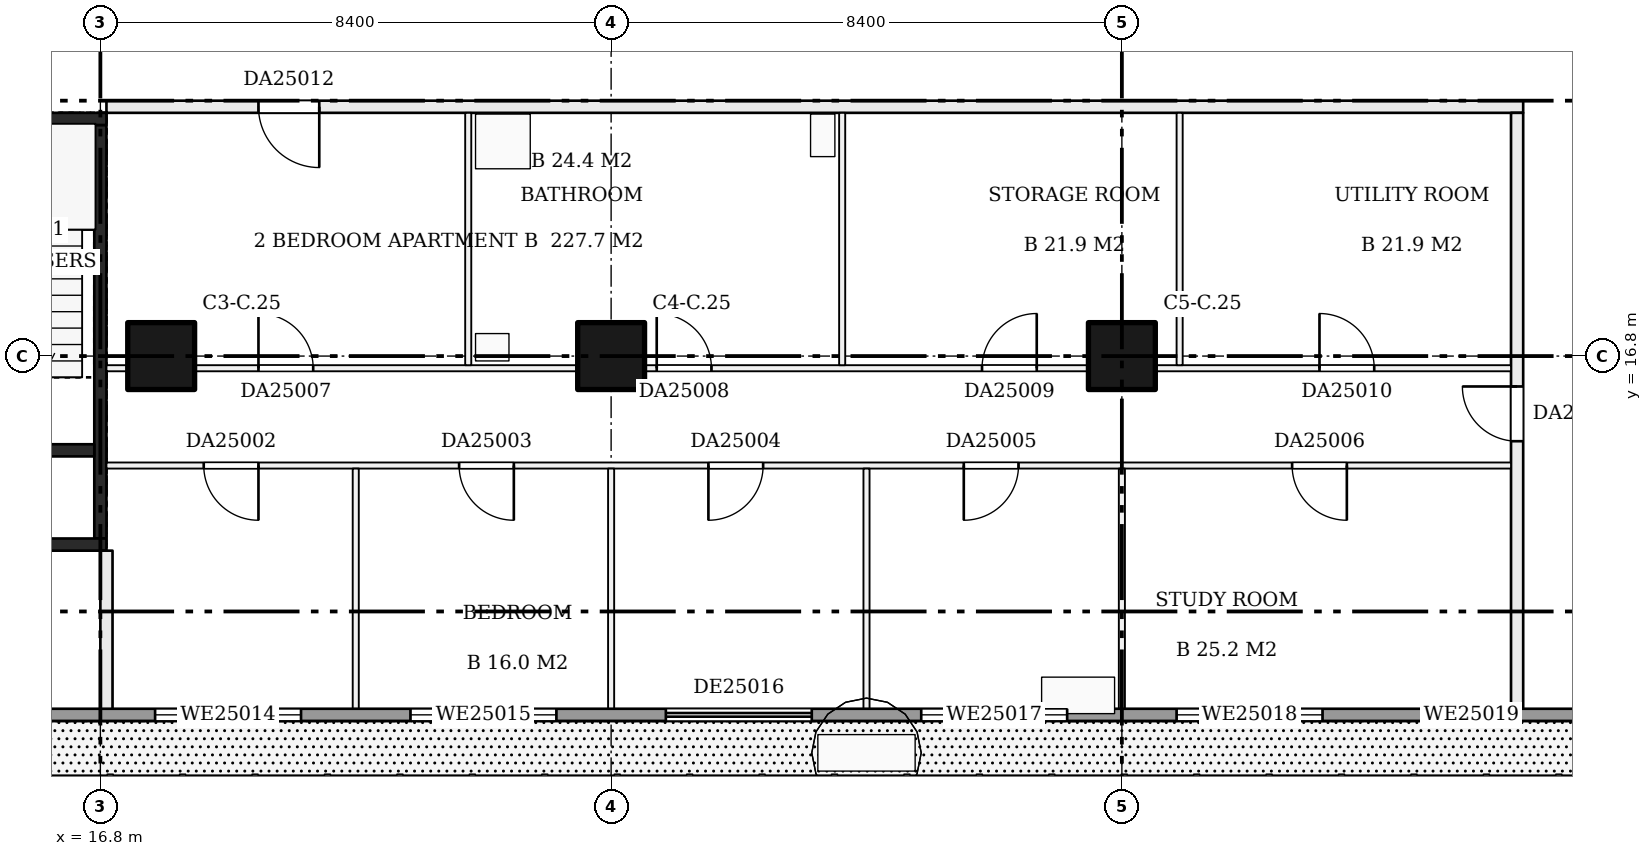
"""IFC4 building model, lengths in metres.
Left out: names, types, materials, properties, quantities, classifications, styles, units other than length and angle.
Written with IfcOpenShell. Run it as: python <this file> out.ifc"""

import sys

from ifc_helpers import new_model, si_unit, direction, frame, frame_2d, origin, origin_2d, place, context, subcontext, project, spatial, rectangle, extrude, element, fill, save


model = new_model("IFC4")
c1 = context("Model", 3, precision=1e-05, world=origin(), true_north=direction((0.0, 1.0)))
c2 = subcontext(c1, "Body", "Model", "MODEL_VIEW")
j1 = project(units=[si_unit("LENGTHUNIT", "METRE"), si_unit("PLANEANGLEUNIT", "RADIAN")], contexts=[c1])
p1 = place(None, origin())
s1 = spatial("IfcSite", under=j1, at=p1, CompositionType="ELEMENT")
p2 = place(p1, origin())
s2 = spatial("IfcBuilding", under=s1, at=p2, CompositionType="ELEMENT")
p3 = place(p2, frame((0.0, 0.0, 102.2)))
s3 = spatial("IfcBuildingStorey", under=s2, at=p3, CompositionType="ELEMENT", Elevation=102.2)
for number, where, z_axis, x_axis in (
    (1, (17.8, 16.8, 0.0), (0.0, 0.0, 1.0), (1.0, 0.0, 0.0)),
    (2, (25.2, 16.8, 0.0), (0.0, 0.0, 1.0), (1.0, 0.0, 0.0)),
    (3, (33.6, 16.8, 0.0), (0.0, 0.0, 1.0), (1.0, 0.0, 0.0)),
):
    element("IfcColumn", number, at=place(p3, frame(where, z_axis=z_axis, x_axis=x_axis)), inside=s3, PredefinedType="COLUMN", context=c2, shape_type="SweptSolid", body=[
        extrude(rectangle(XDim=1.1, YDim=1.1, at=origin_2d()), origin(), (0.0, 0.0, 1.0), 3.22),
    ])
p4 = place(p3, frame((16.8, 13.8, 0.0), z_axis=(0.0, 0.0, 1.0), x_axis=(0.0, 1.0, 0.0)))
e4 = element("IfcWall", 4, at=p4, inside=s3, PredefinedType="SHEAR", context=c2, shape_type="SweptSolid", body=[
    extrude(rectangle(XDim=6.8, YDim=0.2, at=frame_2d((3.4, 0.0))), origin(), (0.0, 0.0, 1.0), 3.22),
])
for number, where, z_axis, x_axis in (
    (5, (13.5, 13.7, 0.0), (0.0, 0.0, 1.0), (1.0, 0.0, 0.0)),
    (6, (13.5, 20.7, 0.0), (0.0, 0.0, 1.0), (1.0, 0.0, 0.0)),
):
    element("IfcWall", number, at=place(p3, frame(where, z_axis=z_axis, x_axis=x_axis)), inside=s3, PredefinedType="SHEAR", context=c2, shape_type="SweptSolid", body=[
        extrude(rectangle(XDim=3.4, YDim=0.2, at=frame_2d((1.7, 0.0))), origin(), (0.0, 0.0, 1.0), 3.22),
    ])
p5 = place(p3, frame((13.7, 15.25, 0.0), z_axis=(0.0, 0.0, 1.0), x_axis=(1.0, 0.0, 0.0)))
e7 = element("IfcWall", 7, at=p5, inside=s3, PredefinedType="SHEAR", context=c2, shape_type="SweptSolid", body=[
    extrude(rectangle(XDim=3.0, YDim=0.2, at=frame_2d((1.5, 0.0))), origin(), (0.0, 0.0, 1.0), 3.22),
])
p6 = place(p5, frame((1.0, 0.0, 0.0)))
e8 = element("IfcOpeningElement", 8, at=p6, cuts=e7, PredefinedType="OPENING", context=c2, shape_type="SweptSolid", body=[
    extrude(rectangle(XDim=1.0, YDim=2.1, at=frame_2d((0.5, 1.05))), frame((0.0, 0.11, 0.0), z_axis=(0.0, -1.0, 0.0), x_axis=(1.0, 0.0, 0.0)), (0.0, 0.0, 1.0), 0.22),
])
p7 = place(p3, frame((16.9, 15.0, 0.0), z_axis=(0.0, 0.0, 1.0), x_axis=(1.0, 0.0, 0.0)))
e9 = element("IfcWall", 9, at=p7, inside=s3, PredefinedType="PARTITIONING", context=c2, shape_type="SweptSolid", body=[
    extrude(rectangle(XDim=23.1, YDim=0.1, at=frame_2d((11.55, 0.0))), origin(), (0.0, 0.0, 1.0), 3.22),
])
p8 = place(p7, frame((1.6, 0.0, 0.0)))
e10 = element("IfcOpeningElement", 10, at=p8, cuts=e9, PredefinedType="OPENING", context=c2, shape_type="SweptSolid", body=[
    extrude(rectangle(XDim=0.9, YDim=2.1, at=frame_2d((0.45, 1.05))), frame((0.0, 0.06, 0.0), z_axis=(0.0, -1.0, 0.0), x_axis=(1.0, 0.0, 0.0)), (0.0, 0.0, 1.0), 0.12),
])
p9 = place(p7, frame((5.8, 0.0, 0.0)))
e11 = element("IfcOpeningElement", 11, at=p9, cuts=e9, PredefinedType="OPENING", context=c2, shape_type="SweptSolid", body=[
    extrude(rectangle(XDim=0.9, YDim=2.1, at=frame_2d((0.45, 1.05))), frame((0.0, 0.06, 0.0), z_axis=(0.0, -1.0, 0.0), x_axis=(1.0, 0.0, 0.0)), (0.0, 0.0, 1.0), 0.12),
])
p10 = place(p7, frame((9.9, 0.0, 0.0)))
e12 = element("IfcOpeningElement", 12, at=p10, cuts=e9, PredefinedType="OPENING", context=c2, shape_type="SweptSolid", body=[
    extrude(rectangle(XDim=0.9, YDim=2.1, at=frame_2d((0.45, 1.05))), frame((0.0, 0.06, 0.0), z_axis=(0.0, -1.0, 0.0), x_axis=(1.0, 0.0, 0.0)), (0.0, 0.0, 1.0), 0.12),
])
p11 = place(p7, frame((14.1, 0.0, 0.0)))
e13 = element("IfcOpeningElement", 13, at=p11, cuts=e9, PredefinedType="OPENING", context=c2, shape_type="SweptSolid", body=[
    extrude(rectangle(XDim=0.9, YDim=2.1, at=frame_2d((0.45, 1.05))), frame((0.0, 0.06, 0.0), z_axis=(0.0, -1.0, 0.0), x_axis=(1.0, 0.0, 0.0)), (0.0, 0.0, 1.0), 0.12),
])
p12 = place(p7, frame((19.5, 0.0, 0.0)))
e14 = element("IfcOpeningElement", 14, at=p12, cuts=e9, PredefinedType="OPENING", context=c2, shape_type="SweptSolid", body=[
    extrude(rectangle(XDim=0.9, YDim=2.1, at=frame_2d((0.45, 1.05))), frame((0.0, 0.06, 0.0), z_axis=(0.0, -1.0, 0.0), x_axis=(1.0, 0.0, 0.0)), (0.0, 0.0, 1.0), 0.12),
])
p13 = place(p3, frame((16.9, 16.6, 0.0), z_axis=(0.0, 0.0, 1.0), x_axis=(1.0, 0.0, 0.0)))
e15 = element("IfcWall", 15, at=p13, inside=s3, PredefinedType="PARTITIONING", context=c2, shape_type="SweptSolid", body=[
    extrude(rectangle(XDim=23.1, YDim=0.1, at=frame_2d((11.55, 0.0))), origin(), (0.0, 0.0, 1.0), 3.22),
])
p14 = place(p13, frame((2.5, 0.0, 0.0)))
e16 = element("IfcOpeningElement", 16, at=p14, cuts=e15, PredefinedType="OPENING", context=c2, shape_type="SweptSolid", body=[
    extrude(rectangle(XDim=0.9, YDim=2.1, at=frame_2d((0.45, 1.05))), frame((0.0, 0.06, 0.0), z_axis=(0.0, -1.0, 0.0), x_axis=(1.0, 0.0, 0.0)), (0.0, 0.0, 1.0), 0.12),
])
p15 = place(p13, frame((9.05, 0.0, 0.0)))
e17 = element("IfcOpeningElement", 17, at=p15, cuts=e15, PredefinedType="OPENING", context=c2, shape_type="SweptSolid", body=[
    extrude(rectangle(XDim=0.9, YDim=2.1, at=frame_2d((0.45, 1.05))), frame((0.0, 0.06, 0.0), z_axis=(0.0, -1.0, 0.0), x_axis=(1.0, 0.0, 0.0)), (0.0, 0.0, 1.0), 0.12),
])
p16 = place(p13, frame((14.4, 0.0, 0.0)))
e18 = element("IfcOpeningElement", 18, at=p16, cuts=e15, PredefinedType="OPENING", context=c2, shape_type="SweptSolid", body=[
    extrude(rectangle(XDim=0.9, YDim=2.1, at=frame_2d((0.45, 1.05))), frame((0.0, 0.06, 0.0), z_axis=(0.0, -1.0, 0.0), x_axis=(1.0, 0.0, 0.0)), (0.0, 0.0, 1.0), 0.12),
])
p17 = place(p13, frame((19.95, 0.0, 0.0)))
e19 = element("IfcOpeningElement", 19, at=p17, cuts=e15, PredefinedType="OPENING", context=c2, shape_type="SweptSolid", body=[
    extrude(rectangle(XDim=0.9, YDim=2.1, at=frame_2d((0.45, 1.05))), frame((0.0, 0.06, 0.0), z_axis=(0.0, -1.0, 0.0), x_axis=(1.0, 0.0, 0.0)), (0.0, 0.0, 1.0), 0.12),
])
p18 = place(p3, frame((16.9, 20.9, 0.0), z_axis=(0.0, 0.0, 1.0), x_axis=(1.0, 0.0, 0.0)))
e20 = element("IfcWall", 20, at=p18, inside=s3, PredefinedType="PARTITIONING", context=c2, shape_type="SweptSolid", body=[
    extrude(rectangle(XDim=23.3, YDim=0.2, at=frame_2d((11.65, 0.0))), origin(), (0.0, 0.0, 1.0), 3.22),
])
p19 = place(p18, frame((2.5, 0.0, 0.0)))
e21 = element("IfcOpeningElement", 21, at=p19, cuts=e20, PredefinedType="OPENING", context=c2, shape_type="SweptSolid", body=[
    extrude(rectangle(XDim=1.0, YDim=2.1, at=frame_2d((0.5, 1.05))), frame((0.0, 0.11, 0.0), z_axis=(0.0, -1.0, 0.0), x_axis=(1.0, 0.0, 0.0)), (0.0, 0.0, 1.0), 0.22),
])
p20 = place(p3, frame((16.9, 10.9, 0.0), z_axis=(0.0, 0.0, 1.0), x_axis=(0.0, 1.0, 0.0)))
e22 = element("IfcWall", 22, at=p20, inside=s3, PredefinedType="PARTITIONING", context=c2, shape_type="SweptSolid", body=[
    extrude(rectangle(XDim=2.7, YDim=0.2, at=frame_2d((1.35, 0.0))), origin(), (0.0, 0.0, 1.0), 3.22),
])
p21 = place(p3, frame((21.0, 10.9, 0.0), z_axis=(0.0, 0.0, 1.0), x_axis=(0.0, 1.0, 0.0)))
e23 = element("IfcWall", 23, at=p21, inside=s3, PredefinedType="PARTITIONING", context=c2, shape_type="SweptSolid", body=[
    extrude(rectangle(XDim=4.05, YDim=0.1, at=frame_2d((2.025, 0.0))), origin(), (0.0, 0.0, 1.0), 3.22),
])
p22 = place(p3, frame((22.85, 16.65, 0.0), z_axis=(0.0, 0.0, 1.0), x_axis=(0.0, 1.0, 0.0)))
e24 = element("IfcWall", 24, at=p22, inside=s3, PredefinedType="PARTITIONING", context=c2, shape_type="SweptSolid", body=[
    extrude(rectangle(XDim=4.15, YDim=0.1, at=frame_2d((2.075, 0.0))), origin(), (0.0, 0.0, 1.0), 3.22),
])
p23 = place(p3, frame((25.2, 10.9, 0.0), z_axis=(0.0, 0.0, 1.0), x_axis=(0.0, 1.0, 0.0)))
e25 = element("IfcWall", 25, at=p23, inside=s3, PredefinedType="PARTITIONING", context=c2, shape_type="SweptSolid", body=[
    extrude(rectangle(XDim=4.05, YDim=0.1, at=frame_2d((2.025, 0.0))), origin(), (0.0, 0.0, 1.0), 3.22),
])
p24 = place(p3, frame((29.0, 16.65, 0.0), z_axis=(0.0, 0.0, 1.0), x_axis=(0.0, 1.0, 0.0)))
e26 = element("IfcWall", 26, at=p24, inside=s3, PredefinedType="PARTITIONING", context=c2, shape_type="SweptSolid", body=[
    extrude(rectangle(XDim=4.15, YDim=0.1, at=frame_2d((2.075, 0.0))), origin(), (0.0, 0.0, 1.0), 3.22),
])
for number, where, z_axis, x_axis in (
    (27, (29.4, 10.9, 0.0), (0.0, 0.0, 1.0), (0.0, 1.0, 0.0)),
    (28, (33.6, 10.9, 0.0), (0.0, 0.0, 1.0), (0.0, 1.0, 0.0)),
):
    element("IfcWall", number, at=place(p3, frame(where, z_axis=z_axis, x_axis=x_axis)), inside=s3, PredefinedType="PARTITIONING", context=c2, shape_type="SweptSolid", body=[
        extrude(rectangle(XDim=4.05, YDim=0.1, at=frame_2d((2.025, 0.0))), origin(), (0.0, 0.0, 1.0), 3.22),
    ])
p25 = place(p3, frame((34.55, 16.65, 0.0), z_axis=(0.0, 0.0, 1.0), x_axis=(0.0, 1.0, 0.0)))
e29 = element("IfcWall", 29, at=p25, inside=s3, PredefinedType="PARTITIONING", context=c2, shape_type="SweptSolid", body=[
    extrude(rectangle(XDim=4.15, YDim=0.1, at=frame_2d((2.075, 0.0))), origin(), (0.0, 0.0, 1.0), 3.22),
])
p26 = place(p3, frame((40.1, 10.9, 0.0), z_axis=(0.0, 0.0, 1.0), x_axis=(0.0, 1.0, 0.0)))
e30 = element("IfcWall", 30, at=p26, inside=s3, PredefinedType="PARTITIONING", context=c2, shape_type="SweptSolid", body=[
    extrude(rectangle(XDim=9.9, YDim=0.2, at=frame_2d((4.95, 0.0))), origin(), (0.0, 0.0, 1.0), 3.22),
])
p27 = place(p26, frame((4.5, 0.0, 0.0)))
e31 = element("IfcOpeningElement", 31, at=p27, cuts=e30, PredefinedType="OPENING", context=c2, shape_type="SweptSolid", body=[
    extrude(rectangle(XDim=0.9, YDim=2.1, at=frame_2d((0.45, 1.05))), frame((0.0, 0.11, 0.0), z_axis=(0.0, -1.0, 0.0), x_axis=(1.0, 0.0, 0.0)), (0.0, 0.0, 1.0), 0.22),
])
p28 = place(p3, frame((4.8, 10.9, 0.0), z_axis=(0.0, 0.0, 1.0), x_axis=(1.0, 0.0, 0.0)))
e32 = element("IfcWall", 32, at=p28, inside=s3, PredefinedType="SOLIDWALL", context=c2, shape_type="SweptSolid", body=[
    extrude(rectangle(XDim=37.2, YDim=0.2, at=frame_2d((18.6, 0.0))), origin(), (0.0, 0.0, 1.0), 3.22),
])
p29 = place(p28, frame((0.3, 0.0, 0.9)))
e33 = element("IfcOpeningElement", 33, at=p29, cuts=e32, PredefinedType="OPENING", context=c2, shape_type="SweptSolid", body=[
    extrude(rectangle(XDim=2.4, YDim=1.5, at=frame_2d((1.2, 0.75))), frame((0.0, 0.11, 0.0), z_axis=(0.0, -1.0, 0.0), x_axis=(1.0, 0.0, 0.0)), (0.0, 0.0, 1.0), 0.22),
])
p30 = place(p28, frame((4.2, 0.0, 0.9)))
e34 = element("IfcOpeningElement", 34, at=p30, cuts=e32, PredefinedType="OPENING", context=c2, shape_type="SweptSolid", body=[
    extrude(rectangle(XDim=2.4, YDim=1.5, at=frame_2d((1.2, 0.75))), frame((0.0, 0.11, 0.0), z_axis=(0.0, -1.0, 0.0), x_axis=(1.0, 0.0, 0.0)), (0.0, 0.0, 1.0), 0.22),
])
p31 = place(p28, frame((12.9, 0.0, 0.9)))
e35 = element("IfcOpeningElement", 35, at=p31, cuts=e32, PredefinedType="OPENING", context=c2, shape_type="SweptSolid", body=[
    extrude(rectangle(XDim=2.4, YDim=1.5, at=frame_2d((1.2, 0.75))), frame((0.0, 0.11, 0.0), z_axis=(0.0, -1.0, 0.0), x_axis=(1.0, 0.0, 0.0)), (0.0, 0.0, 1.0), 0.22),
])
p32 = place(p28, frame((17.1, 0.0, 0.9)))
e36 = element("IfcOpeningElement", 36, at=p32, cuts=e32, PredefinedType="OPENING", context=c2, shape_type="SweptSolid", body=[
    extrude(rectangle(XDim=2.4, YDim=1.5, at=frame_2d((1.2, 0.75))), frame((0.0, 0.11, 0.0), z_axis=(0.0, -1.0, 0.0), x_axis=(1.0, 0.0, 0.0)), (0.0, 0.0, 1.0), 0.22),
])
p33 = place(p28, frame((21.3, 0.0, 0.0)))
e37 = element("IfcOpeningElement", 37, at=p33, cuts=e32, PredefinedType="OPENING", context=c2, shape_type="SweptSolid", body=[
    extrude(rectangle(XDim=2.4, YDim=2.2, at=frame_2d((1.2, 1.1))), frame((0.0, 0.11, 0.0), z_axis=(0.0, -1.0, 0.0), x_axis=(1.0, 0.0, 0.0)), (0.0, 0.0, 1.0), 0.22),
])
p34 = place(p28, frame((25.5, 0.0, 0.9)))
e38 = element("IfcOpeningElement", 38, at=p34, cuts=e32, PredefinedType="OPENING", context=c2, shape_type="SweptSolid", body=[
    extrude(rectangle(XDim=2.4, YDim=1.5, at=frame_2d((1.2, 0.75))), frame((0.0, 0.11, 0.0), z_axis=(0.0, -1.0, 0.0), x_axis=(1.0, 0.0, 0.0)), (0.0, 0.0, 1.0), 0.22),
])
p35 = place(p28, frame((29.7, 0.0, 0.9)))
e39 = element("IfcOpeningElement", 39, at=p35, cuts=e32, PredefinedType="OPENING", context=c2, shape_type="SweptSolid", body=[
    extrude(rectangle(XDim=2.4, YDim=1.5, at=frame_2d((1.2, 0.75))), frame((0.0, 0.11, 0.0), z_axis=(0.0, -1.0, 0.0), x_axis=(1.0, 0.0, 0.0)), (0.0, 0.0, 1.0), 0.22),
])
p36 = place(p28, frame((33.9, 0.0, 0.9)))
e40 = element("IfcOpeningElement", 40, at=p36, cuts=e32, PredefinedType="OPENING", context=c2, shape_type="SweptSolid", body=[
    extrude(rectangle(XDim=1.3, YDim=1.5, at=frame_2d((0.65, 0.75))), frame((0.0, 0.11, 0.0), z_axis=(0.0, -1.0, 0.0), x_axis=(1.0, 0.0, 0.0)), (0.0, 0.0, 1.0), 0.22),
])
p37 = place(p8, frame((0.9, 0.0, 0.0), z_axis=(0.0, 0.0, 1.0), x_axis=(-1.0, 0.0, 0.0)))
e41 = element("IfcDoor", 41, at=p37, inside=s3, OperationType="SINGLE_SWING_LEFT", PredefinedType="DOOR", context=c2, shape_type="SweptSolid", body=[
    extrude(rectangle(XDim=0.9, YDim=2.1, at=frame_2d((0.45, 1.05))), frame((0.0, 0.025, 0.0), z_axis=(0.0, -1.0, 0.0), x_axis=(1.0, 0.0, 0.0)), (0.0, 0.0, 1.0), 0.05),
])
fill(e10, e41)
p38 = place(p9, frame((0.9, 0.0, 0.0), z_axis=(0.0, 0.0, 1.0), x_axis=(-1.0, 0.0, 0.0)))
e42 = element("IfcDoor", 42, at=p38, inside=s3, OperationType="SINGLE_SWING_LEFT", PredefinedType="DOOR", context=c2, shape_type="SweptSolid", body=[
    extrude(rectangle(XDim=0.9, YDim=2.1, at=frame_2d((0.45, 1.05))), frame((0.0, 0.025, 0.0), z_axis=(0.0, -1.0, 0.0), x_axis=(1.0, 0.0, 0.0)), (0.0, 0.0, 1.0), 0.05),
])
fill(e11, e42)
p39 = place(p10, frame((0.9, 0.0, 0.0), z_axis=(0.0, 0.0, 1.0), x_axis=(-1.0, 0.0, 0.0)))
e43 = element("IfcDoor", 43, at=p39, inside=s3, OperationType="SINGLE_SWING_RIGHT", PredefinedType="DOOR", context=c2, shape_type="SweptSolid", body=[
    extrude(rectangle(XDim=0.9, YDim=2.1, at=frame_2d((0.45, 1.05))), frame((0.0, 0.025, 0.0), z_axis=(0.0, -1.0, 0.0), x_axis=(1.0, 0.0, 0.0)), (0.0, 0.0, 1.0), 0.05),
])
fill(e12, e43)
p40 = place(p11, frame((0.9, 0.0, 0.0), z_axis=(0.0, 0.0, 1.0), x_axis=(-1.0, 0.0, 0.0)))
e44 = element("IfcDoor", 44, at=p40, inside=s3, OperationType="SINGLE_SWING_RIGHT", PredefinedType="DOOR", context=c2, shape_type="SweptSolid", body=[
    extrude(rectangle(XDim=0.9, YDim=2.1, at=frame_2d((0.45, 1.05))), frame((0.0, 0.025, 0.0), z_axis=(0.0, -1.0, 0.0), x_axis=(1.0, 0.0, 0.0)), (0.0, 0.0, 1.0), 0.05),
])
fill(e13, e44)
p41 = place(p12, frame((0.9, 0.0, 0.0), z_axis=(0.0, 0.0, 1.0), x_axis=(-1.0, 0.0, 0.0)))
e45 = element("IfcDoor", 45, at=p41, inside=s3, OperationType="SINGLE_SWING_LEFT", PredefinedType="DOOR", context=c2, shape_type="SweptSolid", body=[
    extrude(rectangle(XDim=0.9, YDim=2.1, at=frame_2d((0.45, 1.05))), frame((0.0, 0.025, 0.0), z_axis=(0.0, -1.0, 0.0), x_axis=(1.0, 0.0, 0.0)), (0.0, 0.0, 1.0), 0.05),
])
fill(e14, e45)
p42 = place(p14, origin())
e46 = element("IfcDoor", 46, at=p42, inside=s3, OperationType="SINGLE_SWING_LEFT", PredefinedType="DOOR", context=c2, shape_type="SweptSolid", body=[
    extrude(rectangle(XDim=0.9, YDim=2.1, at=frame_2d((0.45, 1.05))), frame((0.0, 0.025, 0.0), z_axis=(0.0, -1.0, 0.0), x_axis=(1.0, 0.0, 0.0)), (0.0, 0.0, 1.0), 0.05),
])
fill(e16, e46)
p43 = place(p15, origin())
e47 = element("IfcDoor", 47, at=p43, inside=s3, OperationType="SINGLE_SWING_LEFT", PredefinedType="DOOR", context=c2, shape_type="SweptSolid", body=[
    extrude(rectangle(XDim=0.9, YDim=2.1, at=frame_2d((0.45, 1.05))), frame((0.0, 0.025, 0.0), z_axis=(0.0, -1.0, 0.0), x_axis=(1.0, 0.0, 0.0)), (0.0, 0.0, 1.0), 0.05),
])
fill(e17, e47)
p44 = place(p16, origin())
e48 = element("IfcDoor", 48, at=p44, inside=s3, OperationType="SINGLE_SWING_RIGHT", PredefinedType="DOOR", context=c2, shape_type="SweptSolid", body=[
    extrude(rectangle(XDim=0.9, YDim=2.1, at=frame_2d((0.45, 1.05))), frame((0.0, 0.025, 0.0), z_axis=(0.0, -1.0, 0.0), x_axis=(1.0, 0.0, 0.0)), (0.0, 0.0, 1.0), 0.05),
])
fill(e18, e48)
p45 = place(p17, origin())
e49 = element("IfcDoor", 49, at=p45, inside=s3, OperationType="SINGLE_SWING_LEFT", PredefinedType="DOOR", context=c2, shape_type="SweptSolid", body=[
    extrude(rectangle(XDim=0.9, YDim=2.1, at=frame_2d((0.45, 1.05))), frame((0.0, 0.025, 0.0), z_axis=(0.0, -1.0, 0.0), x_axis=(1.0, 0.0, 0.0)), (0.0, 0.0, 1.0), 0.05),
])
fill(e19, e49)
p46 = place(p19, frame((1.0, 0.0, 0.0), z_axis=(0.0, 0.0, 1.0), x_axis=(-1.0, 0.0, 0.0)))
e50 = element("IfcDoor", 50, at=p46, inside=s3, OperationType="SINGLE_SWING_LEFT", PredefinedType="DOOR", context=c2, shape_type="SweptSolid", body=[
    extrude(rectangle(XDim=1.0, YDim=2.1, at=frame_2d((0.5, 1.05))), frame((0.0, 0.025, 0.0), z_axis=(0.0, -1.0, 0.0), x_axis=(1.0, 0.0, 0.0)), (0.0, 0.0, 1.0), 0.05),
])
fill(e21, e50)
p47 = place(p27, origin())
e51 = element("IfcDoor", 51, at=p47, inside=s3, OperationType="SINGLE_SWING_RIGHT", PredefinedType="DOOR", context=c2, shape_type="SweptSolid", body=[
    extrude(rectangle(XDim=0.9, YDim=2.1, at=frame_2d((0.45, 1.05))), frame((0.0, 0.025, 0.0), z_axis=(0.0, -1.0, 0.0), x_axis=(1.0, 0.0, 0.0)), (0.0, 0.0, 1.0), 0.05),
])
fill(e31, e51)
p48 = place(p31, origin())
e52 = element("IfcWindow", 52, at=p48, inside=s3, PartitioningType="SINGLE_PANEL", PredefinedType="WINDOW", context=c2, shape_type="SweptSolid", body=[
    extrude(rectangle(XDim=2.4, YDim=1.5, at=frame_2d((1.2, 0.75))), frame((0.0, 0.03, 0.0), z_axis=(0.0, -1.0, 0.0), x_axis=(1.0, 0.0, 0.0)), (0.0, 0.0, 1.0), 0.06),
])
fill(e35, e52)
p49 = place(p32, origin())
e53 = element("IfcWindow", 53, at=p49, inside=s3, PartitioningType="SINGLE_PANEL", PredefinedType="WINDOW", context=c2, shape_type="SweptSolid", body=[
    extrude(rectangle(XDim=2.4, YDim=1.5, at=frame_2d((1.2, 0.75))), frame((0.0, 0.03, 0.0), z_axis=(0.0, -1.0, 0.0), x_axis=(1.0, 0.0, 0.0)), (0.0, 0.0, 1.0), 0.06),
])
fill(e36, e53)
p50 = place(p33, origin())
e54 = element("IfcDoor", 54, at=p50, inside=s3, OperationType="DOUBLE_DOOR_SLIDING", PredefinedType="DOOR", context=c2, shape_type="SweptSolid", body=[
    extrude(rectangle(XDim=2.4, YDim=2.2, at=frame_2d((1.2, 1.1))), frame((0.0, 0.025, 0.0), z_axis=(0.0, -1.0, 0.0), x_axis=(1.0, 0.0, 0.0)), (0.0, 0.0, 1.0), 0.05),
])
fill(e37, e54)
p51 = place(p34, origin())
e55 = element("IfcWindow", 55, at=p51, inside=s3, PartitioningType="SINGLE_PANEL", PredefinedType="WINDOW", context=c2, shape_type="SweptSolid", body=[
    extrude(rectangle(XDim=2.4, YDim=1.5, at=frame_2d((1.2, 0.75))), frame((0.0, 0.03, 0.0), z_axis=(0.0, -1.0, 0.0), x_axis=(1.0, 0.0, 0.0)), (0.0, 0.0, 1.0), 0.06),
])
fill(e38, e55)
p52 = place(p35, origin())
e56 = element("IfcWindow", 56, at=p52, inside=s3, PartitioningType="SINGLE_PANEL", PredefinedType="WINDOW", context=c2, shape_type="SweptSolid", body=[
    extrude(rectangle(XDim=2.4, YDim=1.5, at=frame_2d((1.2, 0.75))), frame((0.0, 0.03, 0.0), z_axis=(0.0, -1.0, 0.0), x_axis=(1.0, 0.0, 0.0)), (0.0, 0.0, 1.0), 0.06),
])
fill(e39, e56)
p53 = place(p36, origin())
e57 = element("IfcWindow", 57, at=p53, inside=s3, PartitioningType="SINGLE_PANEL", PredefinedType="WINDOW", context=c2, shape_type="SweptSolid", body=[
    extrude(rectangle(XDim=1.3, YDim=1.5, at=frame_2d((0.65, 0.75))), frame((0.0, 0.03, 0.0), z_axis=(0.0, -1.0, 0.0), x_axis=(1.0, 0.0, 0.0)), (0.0, 0.0, 1.0), 0.06),
])
fill(e40, e57)
save(model, sys.argv[1])
